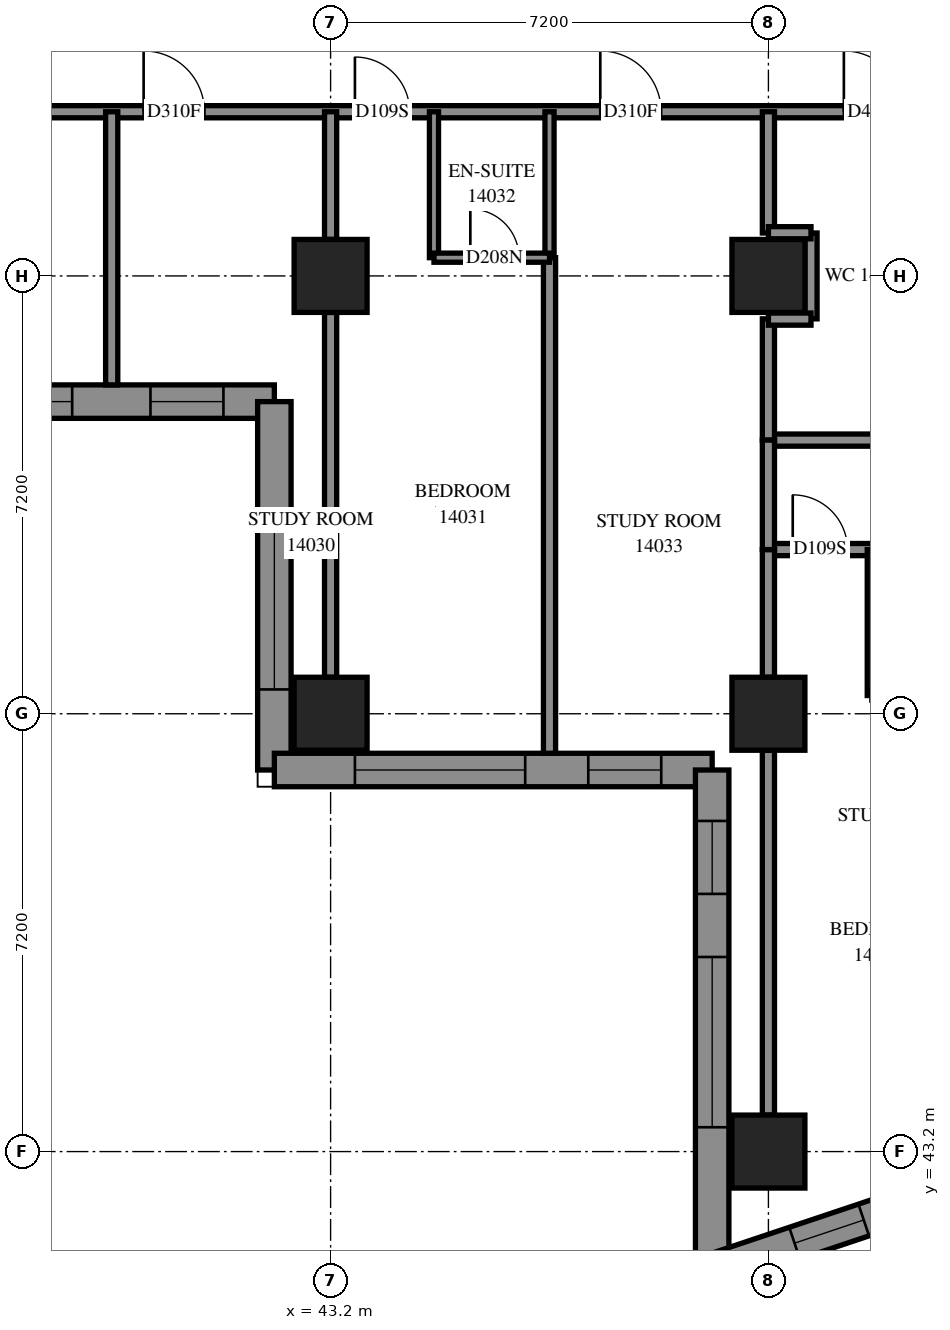
"""IFC4 building model, lengths in metres.
Left out: names, types, materials, properties, quantities, classifications, styles, units other than length and angle.
Written with IfcOpenShell. Run it as: python <this file> out.ifc"""

import sys

from ifc_helpers import new_model, si_unit, direction, frame, frame_2d, origin, origin_2d, place, context, subcontext, project, spatial, polyline, rectangle, outline, extrude, element, fill, save


model = new_model("IFC4")
c1 = context("Model", 3, precision=1e-05, world=origin(), true_north=direction((0.0, 1.0)))
c2 = subcontext(c1, "Body", "Model", "MODEL_VIEW")
j1 = project(units=[si_unit("LENGTHUNIT", "METRE"), si_unit("PLANEANGLEUNIT", "RADIAN")], contexts=[c1])
p1 = place(None, origin())
s1 = spatial("IfcSite", under=j1, at=p1, CompositionType="ELEMENT")
p2 = place(p1, origin())
s2 = spatial("IfcBuilding", under=s1, at=p2, CompositionType="ELEMENT")
p3 = place(p2, frame((0.0, 0.0, 54.2)))
s3 = spatial("IfcBuildingStorey", under=s2, at=p3, CompositionType="ELEMENT", Elevation=54.2)
for number, where, z_axis, x_axis in (
    (1, (43.2, 50.4, 0.0), (0.0, 0.0, 1.0), (1.0, 0.0, 0.0)),
    (2, (43.2, 57.6, 0.0), (0.0, 0.0, 1.0), (1.0, 0.0, 0.0)),
    (3, (50.4, 43.2, 0.0), (0.0, 0.0, 1.0), (1.0, 0.0, 0.0)),
    (4, (50.4, 50.4, 0.0), (0.0, 0.0, 1.0), (1.0, 0.0, 0.0)),
    (5, (50.4, 57.6, 0.0), (0.0, 0.0, 1.0), (1.0, 0.0, 0.0)),
):
    element("IfcColumn", number, at=place(p3, frame(where, z_axis=z_axis, x_axis=x_axis)), inside=s3, PredefinedType="COLUMN", context=c2, shape_type="SweptSolid", body=[
        extrude(rectangle(XDim=1.2, YDim=1.2, at=origin_2d()), origin(), (0.0, 0.0, 1.0), 3.1),
    ])
p4 = place(p3, frame((27.875, 55.533, 0.0), z_axis=(0.0, 0.0, 1.0), x_axis=(1.0, 0.0, 0.0)))
e6 = element("IfcWall", 6, at=p4, inside=s3, PredefinedType="SOLIDWALL", context=c2, shape_type="SweptSolid", body=[
    extrude(outline(polyline([(-0.275, -0.275), (14.125, -0.275), (14.675, 0.275), (0.275, 0.275), (-0.275, -0.275)])), origin(), (0.0, 0.0, 1.0), 3.1),
])
p5 = place(p4, frame((1.325, 0.0, 0.5)))
e7 = element("IfcOpeningElement", 7, at=p5, cuts=e6, PredefinedType="OPENING", context=c2, shape_type="SweptSolid", body=[
    extrude(rectangle(XDim=2.8, YDim=2.45, at=frame_2d((1.4, 1.225))), frame((0.0, 0.285, 0.0), z_axis=(0.0, -1.0, 0.0), x_axis=(1.0, 0.0, 0.0)), (0.0, 0.0, 1.0), 0.57),
])
p6 = place(p4, frame((4.925, 0.0, 0.5)))
e8 = element("IfcOpeningElement", 8, at=p6, cuts=e6, PredefinedType="OPENING", context=c2, shape_type="SweptSolid", body=[
    extrude(rectangle(XDim=2.8, YDim=2.45, at=frame_2d((1.4, 1.225))), frame((0.0, 0.285, 0.0), z_axis=(0.0, -1.0, 0.0), x_axis=(1.0, 0.0, 0.0)), (0.0, 0.0, 1.0), 0.57),
])
p7 = place(p4, frame((8.275, 0.0, 0.5)))
e9 = element("IfcOpeningElement", 9, at=p7, cuts=e6, PredefinedType="OPENING", context=c2, shape_type="SweptSolid", body=[
    extrude(rectangle(XDim=2.8, YDim=2.45, at=frame_2d((1.4, 1.225))), frame((0.0, 0.285, 0.0), z_axis=(0.0, -1.0, 0.0), x_axis=(1.0, 0.0, 0.0)), (0.0, 0.0, 1.0), 0.57),
])
p8 = place(p4, frame((12.363, 0.0, 0.5)))
e10 = element("IfcOpeningElement", 10, at=p8, cuts=e6, PredefinedType="OPENING", context=c2, shape_type="SweptSolid", body=[
    extrude(rectangle(XDim=1.2, YDim=2.45, at=frame_2d((0.6, 1.225))), frame((0.0, 0.285, 0.0), z_axis=(0.0, -1.0, 0.0), x_axis=(1.0, 0.0, 0.0)), (0.0, 0.0, 1.0), 0.57),
])
p9 = place(p3, frame((42.275, 55.533, 0.0), z_axis=(0.0, 0.0, 1.0), x_axis=(0.0, -1.0, 0.0)))
e11 = element("IfcWall", 11, at=p9, inside=s3, PredefinedType="SOLIDWALL", context=c2, shape_type="SweptSolid", body=[
    extrude(outline(polyline([(0.275, -0.275), (6.333, -0.275), (5.783, 0.275), (-0.275, 0.275), (0.275, -0.275)])), origin(), (0.0, 0.0, 1.0), 3.1),
])
p10 = place(p9, frame((1.933, 0.0, 0.5)))
e12 = element("IfcOpeningElement", 12, at=p10, cuts=e11, PredefinedType="OPENING", context=c2, shape_type="SweptSolid", body=[
    extrude(rectangle(XDim=2.8, YDim=2.45, at=frame_2d((1.4, 1.225))), frame((0.0, 0.285, 0.0), z_axis=(0.0, -1.0, 0.0), x_axis=(1.0, 0.0, 0.0)), (0.0, 0.0, 1.0), 0.57),
])
p11 = place(p3, frame((42.275, 49.475, 0.0), z_axis=(0.0, 0.0, 1.0), x_axis=(1.0, 0.0, 0.0)))
e13 = element("IfcWall", 13, at=p11, inside=s3, PredefinedType="SOLIDWALL", context=c2, shape_type="SweptSolid", body=[
    extrude(outline(polyline([(-0.275, -0.275), (6.925, -0.275), (7.475, 0.275), (0.275, 0.275), (-0.275, -0.275)])), origin(), (0.0, 0.0, 1.0), 3.1),
])
p12 = place(p11, frame((1.325, 0.0, 0.5)))
e14 = element("IfcOpeningElement", 14, at=p12, cuts=e13, PredefinedType="OPENING", context=c2, shape_type="SweptSolid", body=[
    extrude(rectangle(XDim=2.8, YDim=2.45, at=frame_2d((1.4, 1.225))), frame((0.0, 0.285, 0.0), z_axis=(0.0, -1.0, 0.0), x_axis=(1.0, 0.0, 0.0)), (0.0, 0.0, 1.0), 0.57),
])
p13 = place(p11, frame((5.162, 0.0, 0.5)))
e15 = element("IfcOpeningElement", 15, at=p13, cuts=e13, PredefinedType="OPENING", context=c2, shape_type="SweptSolid", body=[
    extrude(rectangle(XDim=1.2, YDim=2.45, at=frame_2d((0.6, 1.225))), frame((0.0, 0.285, 0.0), z_axis=(0.0, -1.0, 0.0), x_axis=(1.0, 0.0, 0.0)), (0.0, 0.0, 1.0), 0.57),
])
p14 = place(p3, frame((49.475, 49.475, 0.0), z_axis=(0.0, 0.0, 1.0), x_axis=(0.0, -1.0, 0.0)))
e16 = element("IfcWall", 16, at=p14, inside=s3, PredefinedType="SOLIDWALL", context=c2, shape_type="SweptSolid", body=[
    extrude(outline(polyline([(0.275, -0.275), (8.617, -0.275), (7.853, 0.275), (-0.275, 0.275), (0.275, -0.275)])), origin(), (0.0, 0.0, 1.0), 3.1),
])
p15 = place(p14, frame((3.075, 0.0, 0.5)))
e17 = element("IfcOpeningElement", 17, at=p15, cuts=e16, PredefinedType="OPENING", context=c2, shape_type="SweptSolid", body=[
    extrude(rectangle(XDim=2.8, YDim=2.45, at=frame_2d((1.4, 1.225))), frame((0.0, 0.285, 0.0), z_axis=(0.0, -1.0, 0.0), x_axis=(1.0, 0.0, 0.0)), (0.0, 0.0, 1.0), 0.57),
])
p16 = place(p14, frame((0.838, 0.0, 0.5)))
e18 = element("IfcOpeningElement", 18, at=p16, cuts=e16, PredefinedType="OPENING", context=c2, shape_type="SweptSolid", body=[
    extrude(rectangle(XDim=1.2, YDim=2.45, at=frame_2d((0.6, 1.225))), frame((0.0, 0.285, 0.0), z_axis=(0.0, -1.0, 0.0), x_axis=(1.0, 0.0, 0.0)), (0.0, 0.0, 1.0), 0.57),
])
p17 = place(p3, frame((49.475, 41.24, 0.0), z_axis=(0.0, 0.0, 1.0), x_axis=(0.9482466671, 0.3175346568, 0.0)))
e19 = element("IfcWall", 19, at=p17, inside=s3, PredefinedType="SOLIDWALL", context=c2, shape_type="SweptSolid", body=[
    extrude(outline(polyline([(-0.382, -0.275), (3.214, -0.275), (3.349, 0.275), (0.382, 0.275), (-0.382, -0.275)])), origin(), (0.0, 0.0, 1.0), 3.1),
])
p18 = place(p17, frame((1.429, 0.0, 0.5)))
e20 = element("IfcOpeningElement", 20, at=p18, cuts=e19, PredefinedType="OPENING", context=c2, shape_type="SweptSolid", body=[
    extrude(rectangle(XDim=1.2, YDim=2.45, at=frame_2d((0.6, 1.225))), frame((0.0, 0.285, 0.0), z_axis=(0.0, -1.0, 0.0), x_axis=(1.0, 0.0, 0.0)), (0.0, 0.0, 1.0), 0.57),
])
p19 = place(p3, frame((28.802, 60.3, 0.0), z_axis=(0.0, 0.0, 1.0), x_axis=(1.0, 0.0, 0.0)))
e21 = element("IfcWall", 21, at=p19, inside=s3, PredefinedType="PARTITIONING", context=c2, shape_type="SweptSolid", body=[
    extrude(rectangle(XDim=24.108, YDim=0.2, at=frame_2d((12.054, 0.0))), origin(), (0.0, 0.0, 1.0), 3.1),
])
p20 = place(p19, frame((11.323, 0.0, 0.0)))
e22 = element("IfcOpeningElement", 22, at=p20, cuts=e21, PredefinedType="OPENING", context=c2, shape_type="SweptSolid", body=[
    extrude(rectangle(XDim=1.0, YDim=2.1, at=frame_2d((0.5, 1.05))), frame((0.0, 0.11, 0.0), z_axis=(0.0, -1.0, 0.0), x_axis=(1.0, 0.0, 0.0)), (0.0, 0.0, 1.0), 0.22),
])
p21 = place(p19, frame((14.798, 0.0, 0.0)))
e23 = element("IfcOpeningElement", 23, at=p21, cuts=e21, PredefinedType="OPENING", context=c2, shape_type="SweptSolid", body=[
    extrude(rectangle(XDim=0.9, YDim=2.1, at=frame_2d((0.45, 1.05))), frame((0.0, 0.11, 0.0), z_axis=(0.0, -1.0, 0.0), x_axis=(1.0, 0.0, 0.0)), (0.0, 0.0, 1.0), 0.22),
])
p22 = place(p19, frame((18.833, 0.0, 0.0)))
e24 = element("IfcOpeningElement", 24, at=p22, cuts=e21, PredefinedType="OPENING", context=c2, shape_type="SweptSolid", body=[
    extrude(rectangle(XDim=1.0, YDim=2.1, at=frame_2d((0.5, 1.05))), frame((0.0, 0.11, 0.0), z_axis=(0.0, -1.0, 0.0), x_axis=(1.0, 0.0, 0.0)), (0.0, 0.0, 1.0), 0.22),
])
p23 = place(p19, frame((22.839, 0.0, 0.0)))
e25 = element("IfcOpeningElement", 25, at=p23, cuts=e21, PredefinedType="OPENING", context=c2, shape_type="SweptSolid", body=[
    extrude(rectangle(XDim=1.0, YDim=2.1, at=frame_2d((0.5, 1.05))), frame((0.0, 0.11, 0.0), z_axis=(0.0, -1.0, 0.0), x_axis=(1.0, 0.0, 0.0)), (0.0, 0.0, 1.0), 0.22),
])
p24 = place(p3, frame((46.8, 49.75, 0.0), z_axis=(0.0, 0.0, 1.0), x_axis=(0.0, 1.0, 0.0)))
e26 = element("IfcWall", 26, at=p24, inside=s3, PredefinedType="PARTITIONING", context=c2, shape_type="SweptSolid", body=[
    extrude(rectangle(XDim=8.15, YDim=0.2, at=frame_2d((4.075, 0.0))), origin(), (0.0, 0.0, 1.0), 3.1),
])
for number, where, z_axis, x_axis in (
    (27, (43.2, 51.0, 0.0), (0.0, 0.0, 1.0), (0.0, 1.0, 0.0)),
    (28, (50.4, 43.8, 0.0), (0.0, 0.0, 1.0), (0.0, 1.0, 0.0)),
):
    element("IfcWall", number, at=place(p3, frame(where, z_axis=z_axis, x_axis=x_axis)), inside=s3, PredefinedType="PARTITIONING", context=c2, shape_type="SweptSolid", body=[
        extrude(rectangle(XDim=6.0, YDim=0.2, at=frame_2d((3.0, 0.0))), origin(), (0.0, 0.0, 1.0), 2.6),
    ])
p25 = place(p3, frame((39.6, 55.808, 0.0), z_axis=(0.0, 0.0, 1.0), x_axis=(0.0, 1.0, 0.0)))
e29 = element("IfcWall", 29, at=p25, inside=s3, PredefinedType="PARTITIONING", context=c2, shape_type="SweptSolid", body=[
    extrude(rectangle(XDim=4.492, YDim=0.2, at=frame_2d((2.246, 0.0))), origin(), (0.0, 0.0, 1.0), 3.1),
])
p26 = place(p3, frame((50.4, 53.1, 0.0), z_axis=(0.0, 0.0, 1.0), x_axis=(1.0, 0.0, 0.0)))
e30 = element("IfcWall", 30, at=p26, inside=s3, PredefinedType="PARTITIONING", context=c2, shape_type="SweptSolid", body=[
    extrude(rectangle(XDim=4.1, YDim=0.2, at=frame_2d((2.05, 0.0))), origin(), (0.0, 0.0, 1.0), 3.1),
])
p27 = place(p26, frame((0.4, 0.0, 0.0)))
e31 = element("IfcOpeningElement", 31, at=p27, cuts=e30, PredefinedType="OPENING", context=c2, shape_type="SweptSolid", body=[
    extrude(rectangle(XDim=0.9, YDim=2.1, at=frame_2d((0.45, 1.05))), frame((0.0, 0.11, 0.0), z_axis=(0.0, -1.0, 0.0), x_axis=(1.0, 0.0, 0.0)), (0.0, 0.0, 1.0), 0.22),
])
p28 = place(p3, frame((50.4, 54.9, 0.0), z_axis=(0.0, 0.0, 1.0), x_axis=(1.0, 0.0, 0.0)))
e32 = element("IfcWall", 32, at=p28, inside=s3, PredefinedType="PARTITIONING", context=c2, shape_type="SweptSolid", body=[
    extrude(rectangle(XDim=2.51, YDim=0.2, at=frame_2d((1.255, 0.0))), origin(), (0.0, 0.0, 1.0), 3.1),
])
for number, where, z_axis, x_axis in (
    (33, (44.9, 57.9, 0.0), (0.0, 0.0, 1.0), (0.0, 1.0, 0.0)),
    (34, (46.8, 57.9, 0.0), (0.0, 0.0, 1.0), (0.0, 1.0, 0.0)),
    (35, (52.1, 50.7, 0.0), (0.0, 0.0, 1.0), (0.0, 1.0, 0.0)),
):
    element("IfcWall", number, at=place(p3, frame(where, z_axis=z_axis, x_axis=x_axis)), inside=s3, PredefinedType="PARTITIONING", context=c2, shape_type="SweptSolid", body=[
        extrude(rectangle(XDim=2.4, YDim=0.15, at=frame_2d((1.2, 0.0))), origin(), (0.0, 0.0, 1.0), 3.1),
    ])
for number, where, z_axis, x_axis in (
    (36, (50.4, 51.0, 0.0), (0.0, 0.0, 1.0), (0.0, 1.0, 0.0)),
    (37, (43.2, 58.2, 0.0), (0.0, 0.0, 1.0), (0.0, 1.0, 0.0)),
):
    element("IfcWall", number, at=place(p3, frame(where, z_axis=z_axis, x_axis=x_axis)), inside=s3, PredefinedType="PARTITIONING", context=c2, shape_type="SweptSolid", body=[
        extrude(rectangle(XDim=2.1, YDim=0.2, at=frame_2d((1.05, 0.0))), origin(), (0.0, 0.0, 1.0), 3.1),
    ])
for number, where, z_axis, x_axis in (
    (38, (50.4, 54.9, 0.0), (0.0, 0.0, 1.0), (0.0, 1.0, 0.0)),
    (39, (50.4, 58.306, 0.0), (0.0, 0.0, 1.0), (0.0, 1.0, 0.0)),
):
    element("IfcWall", number, at=place(p3, frame(where, z_axis=z_axis, x_axis=x_axis)), inside=s3, PredefinedType="PARTITIONING", context=c2, shape_type="SweptSolid", body=[
        extrude(rectangle(XDim=1.994, YDim=0.2, at=frame_2d((0.997, 0.0))), origin(), (0.0, 0.0, 1.0), 3.1),
    ])
p29 = place(p3, frame((44.9, 57.9, 0.0), z_axis=(0.0, 0.0, 1.0), x_axis=(1.0, 0.0, 0.0)))
e40 = element("IfcWall", 40, at=p29, inside=s3, PredefinedType="PARTITIONING", context=c2, shape_type="SweptSolid", body=[
    extrude(rectangle(XDim=1.9, YDim=0.15, at=frame_2d((0.95, 0.0))), origin(), (0.0, 0.0, 1.0), 3.1),
])
p30 = place(p29, frame((0.598, 0.0, 0.0)))
e41 = element("IfcOpeningElement", 41, at=p30, cuts=e40, PredefinedType="OPENING", context=c2, shape_type="SweptSolid", body=[
    extrude(rectangle(XDim=0.8, YDim=2.1, at=frame_2d((0.4, 1.05))), frame((0.0, 0.085, 0.0), z_axis=(0.0, -1.0, 0.0), x_axis=(1.0, 0.0, 0.0)), (0.0, 0.0, 1.0), 0.17),
])
p31 = place(p3, frame((50.4, 53.1, 0.0), z_axis=(0.0, 0.0, 1.0), x_axis=(0.0, 1.0, 0.0)))
e42 = element("IfcWall", 42, at=p31, inside=s3, PredefinedType="PARTITIONING", context=c2, shape_type="SweptSolid", body=[
    extrude(rectangle(XDim=1.8, YDim=0.2, at=frame_2d((0.9, 0.0))), origin(), (0.0, 0.0, 1.0), 3.1),
])
p32 = place(p3, frame((51.1, 56.894, 0.0), z_axis=(0.0, 0.0, 1.0), x_axis=(0.0, 1.0, 0.0)))
e43 = element("IfcWall", 43, at=p32, inside=s3, PredefinedType="PARTITIONING", context=c2, shape_type="SweptSolid", body=[
    extrude(rectangle(XDim=1.412, YDim=0.2, at=frame_2d((0.706, 0.0))), origin(), (0.0, 0.0, 1.0), 3.1),
])
for number, where, z_axis, x_axis in (
    (44, (50.4, 58.31, 0.0), (0.0, 0.0, 1.0), (1.0, 0.0, 0.0)),
    (45, (50.4, 56.89, 0.0), (0.0, 0.0, 1.0), (1.0, 0.0, 0.0)),
):
    element("IfcWall", number, at=place(p3, frame(where, z_axis=z_axis, x_axis=x_axis)), inside=s3, PredefinedType="PARTITIONING", context=c2, shape_type="SweptSolid", body=[
        extrude(rectangle(XDim=0.7, YDim=0.2, at=frame_2d((0.35, 0.0))), origin(), (0.0, 0.0, 1.0), 3.1),
    ])
p33 = place(p7, origin())
e46 = element("IfcWindow", 46, at=p33, inside=s3, PartitioningType="SINGLE_PANEL", PredefinedType="WINDOW", context=c2, shape_type="SweptSolid", body=[
    extrude(rectangle(XDim=2.8, YDim=2.45, at=frame_2d((1.4, 1.225))), frame((0.0, 0.155, 0.0), z_axis=(0.0, -1.0, 0.0), x_axis=(1.0, 0.0, 0.0)), (0.0, 0.0, 1.0), 0.06),
])
fill(e9, e46)
p34 = place(p8, origin())
e47 = element("IfcWindow", 47, at=p34, inside=s3, PartitioningType="SINGLE_PANEL", PredefinedType="WINDOW", context=c2, shape_type="SweptSolid", body=[
    extrude(rectangle(XDim=1.2, YDim=2.45, at=frame_2d((0.6, 1.225))), frame((0.0, 0.155, 0.0), z_axis=(0.0, -1.0, 0.0), x_axis=(1.0, 0.0, 0.0)), (0.0, 0.0, 1.0), 0.06),
])
fill(e10, e47)
p35 = place(p10, origin())
e48 = element("IfcWindow", 48, at=p35, inside=s3, PartitioningType="SINGLE_PANEL", PredefinedType="WINDOW", context=c2, shape_type="SweptSolid", body=[
    extrude(rectangle(XDim=2.8, YDim=2.45, at=frame_2d((1.4, 1.225))), frame((0.0, 0.155, 0.0), z_axis=(0.0, -1.0, 0.0), x_axis=(1.0, 0.0, 0.0)), (0.0, 0.0, 1.0), 0.06),
])
fill(e12, e48)
p36 = place(p12, origin())
e49 = element("IfcWindow", 49, at=p36, inside=s3, PartitioningType="SINGLE_PANEL", PredefinedType="WINDOW", context=c2, shape_type="SweptSolid", body=[
    extrude(rectangle(XDim=2.8, YDim=2.45, at=frame_2d((1.4, 1.225))), frame((0.0, 0.155, 0.0), z_axis=(0.0, -1.0, 0.0), x_axis=(1.0, 0.0, 0.0)), (0.0, 0.0, 1.0), 0.06),
])
fill(e14, e49)
p37 = place(p13, origin())
e50 = element("IfcWindow", 50, at=p37, inside=s3, PartitioningType="SINGLE_PANEL", PredefinedType="WINDOW", context=c2, shape_type="SweptSolid", body=[
    extrude(rectangle(XDim=1.2, YDim=2.45, at=frame_2d((0.6, 1.225))), frame((0.0, 0.155, 0.0), z_axis=(0.0, -1.0, 0.0), x_axis=(1.0, 0.0, 0.0)), (0.0, 0.0, 1.0), 0.06),
])
fill(e15, e50)
p38 = place(p15, origin())
e51 = element("IfcWindow", 51, at=p38, inside=s3, PartitioningType="SINGLE_PANEL", PredefinedType="WINDOW", context=c2, shape_type="SweptSolid", body=[
    extrude(rectangle(XDim=2.8, YDim=2.45, at=frame_2d((1.4, 1.225))), frame((0.0, 0.155, 0.0), z_axis=(0.0, -1.0, 0.0), x_axis=(1.0, 0.0, 0.0)), (0.0, 0.0, 1.0), 0.06),
])
fill(e17, e51)
p39 = place(p16, origin())
e52 = element("IfcWindow", 52, at=p39, inside=s3, PartitioningType="SINGLE_PANEL", PredefinedType="WINDOW", context=c2, shape_type="SweptSolid", body=[
    extrude(rectangle(XDim=1.2, YDim=2.45, at=frame_2d((0.6, 1.225))), frame((0.0, 0.155, 0.0), z_axis=(0.0, -1.0, 0.0), x_axis=(1.0, 0.0, 0.0)), (0.0, 0.0, 1.0), 0.06),
])
fill(e18, e52)
p40 = place(p18, origin())
e53 = element("IfcWindow", 53, at=p40, inside=s3, PartitioningType="SINGLE_PANEL", PredefinedType="WINDOW", context=c2, shape_type="SweptSolid", body=[
    extrude(rectangle(XDim=1.2, YDim=2.45, at=frame_2d((0.6, 1.225))), frame((0.0, 0.155, 0.0), z_axis=(0.0, -1.0, 0.0), x_axis=(1.0, 0.0, 0.0)), (0.0, 0.0, 1.0), 0.06),
])
fill(e20, e53)
p41 = place(p20, origin())
e54 = element("IfcDoor", 54, at=p41, inside=s3, OperationType="SINGLE_SWING_RIGHT", PredefinedType="DOOR", context=c2, shape_type="SweptSolid", body=[
    extrude(rectangle(XDim=1.0, YDim=2.1, at=frame_2d((0.5, 1.05))), frame((0.0, 0.025, 0.0), z_axis=(0.0, -1.0, 0.0), x_axis=(1.0, 0.0, 0.0)), (0.0, 0.0, 1.0), 0.05),
])
fill(e22, e54)
p42 = place(p21, origin())
e55 = element("IfcDoor", 55, at=p42, inside=s3, OperationType="SINGLE_SWING_LEFT", PredefinedType="DOOR", context=c2, shape_type="SweptSolid", body=[
    extrude(rectangle(XDim=0.9, YDim=2.1, at=frame_2d((0.45, 1.05))), frame((0.0, 0.025, 0.0), z_axis=(0.0, -1.0, 0.0), x_axis=(1.0, 0.0, 0.0)), (0.0, 0.0, 1.0), 0.05),
])
fill(e23, e55)
p43 = place(p30, origin())
e56 = element("IfcDoor", 56, at=p43, inside=s3, OperationType="SINGLE_SWING_RIGHT", PredefinedType="DOOR", context=c2, shape_type="SweptSolid", body=[
    extrude(rectangle(XDim=0.8, YDim=2.1, at=frame_2d((0.4, 1.05))), frame((0.0, 0.025, 0.0), z_axis=(0.0, -1.0, 0.0), x_axis=(1.0, 0.0, 0.0)), (0.0, 0.0, 1.0), 0.05),
])
fill(e41, e56)
p44 = place(p22, origin())
e57 = element("IfcDoor", 57, at=p44, inside=s3, OperationType="SINGLE_SWING_RIGHT", PredefinedType="DOOR", context=c2, shape_type="SweptSolid", body=[
    extrude(rectangle(XDim=1.0, YDim=2.1, at=frame_2d((0.5, 1.05))), frame((0.0, 0.025, 0.0), z_axis=(0.0, -1.0, 0.0), x_axis=(1.0, 0.0, 0.0)), (0.0, 0.0, 1.0), 0.05),
])
fill(e24, e57)
p45 = place(p23, origin())
e58 = element("IfcDoor", 58, at=p45, inside=s3, OperationType="SINGLE_SWING_LEFT", PredefinedType="DOOR", context=c2, shape_type="SweptSolid", body=[
    extrude(rectangle(XDim=1.0, YDim=2.1, at=frame_2d((0.5, 1.05))), frame((0.0, 0.025, 0.0), z_axis=(0.0, -1.0, 0.0), x_axis=(1.0, 0.0, 0.0)), (0.0, 0.0, 1.0), 0.05),
])
fill(e25, e58)
p46 = place(p27, origin())
e59 = element("IfcDoor", 59, at=p46, inside=s3, OperationType="SINGLE_SWING_LEFT", PredefinedType="DOOR", context=c2, shape_type="SweptSolid", body=[
    extrude(rectangle(XDim=0.9, YDim=2.1, at=frame_2d((0.45, 1.05))), frame((0.0, 0.025, 0.0), z_axis=(0.0, -1.0, 0.0), x_axis=(1.0, 0.0, 0.0)), (0.0, 0.0, 1.0), 0.05),
])
fill(e31, e59)
save(model, sys.argv[1])
